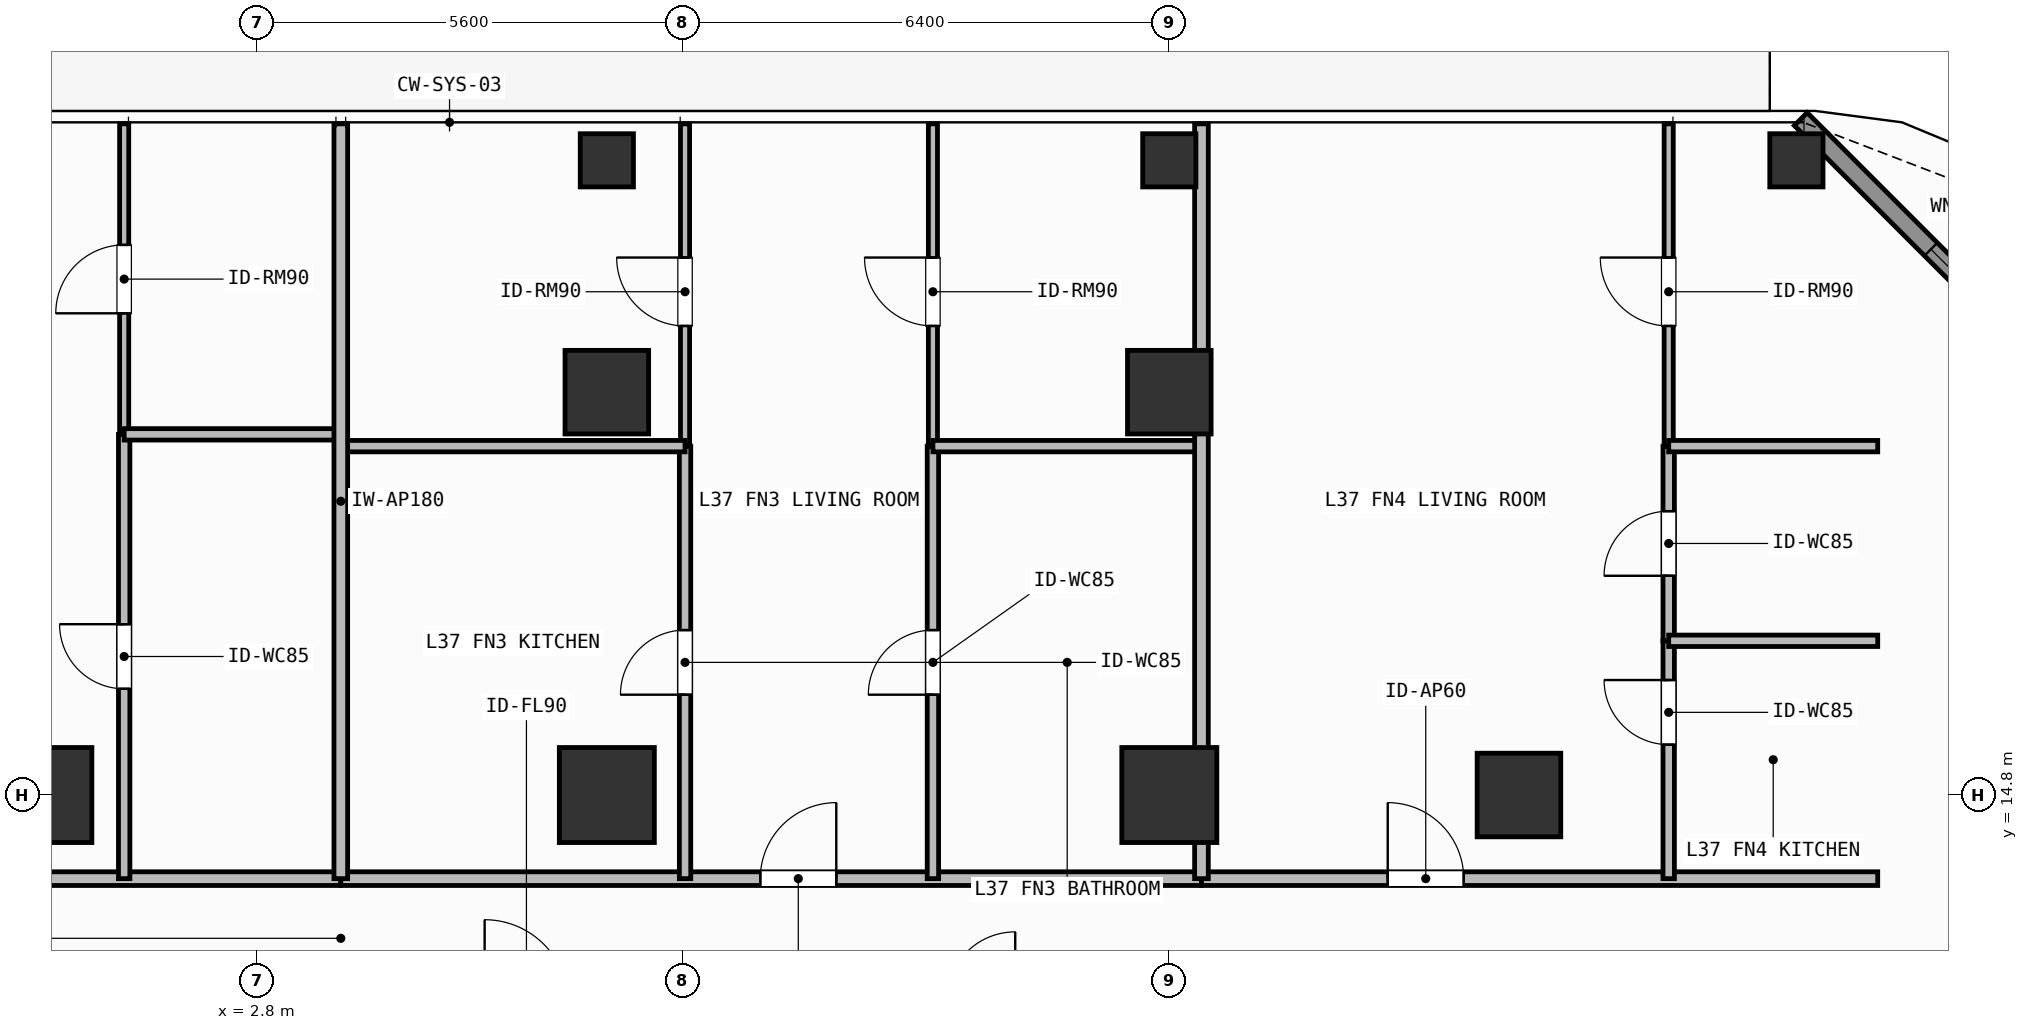
"""IFC4 building model, lengths in metres.
Left out: names, types, materials, properties, quantities, classifications, styles, units other than length and angle.
Written with IfcOpenShell. Run it as: python <this file> out.ifc"""

import sys

from ifc_helpers import new_model, si_unit, direction, frame, frame_2d, origin, origin_2d, place, context, subcontext, project, spatial, rectangle, hollow_rectangle, extrude, element, fill, save


model = new_model("IFC4")
c1 = context("Model", 3, precision=1e-05, world=origin(), true_north=direction((0.0, 1.0)))
c2 = subcontext(c1, "Body", "Model", "MODEL_VIEW")
j1 = project(units=[si_unit("LENGTHUNIT", "METRE"), si_unit("PLANEANGLEUNIT", "RADIAN")], contexts=[c1])
p1 = place(None, origin())
s1 = spatial("IfcSite", under=j1, at=p1, CompositionType="ELEMENT")
p2 = place(p1, origin())
s2 = spatial("IfcBuilding", under=s1, at=p2, CompositionType="ELEMENT")
p3 = place(p2, frame((0.0, 0.0, 148.5)))
s3 = spatial("IfcBuildingStorey", under=s2, at=p3, CompositionType="ELEMENT", Elevation=148.5)
for number, where, z_axis, x_axis in (
    (1, (0.0, 14.8, 0.0), (0.0, 0.0, 1.0), (1.0, 0.0, 0.0)),
    (2, (7.4, 14.8, 0.0), (0.0, 0.0, 1.0), (1.0, 0.0, 0.0)),
    (3, (14.8, 14.8, 0.0), (0.0, 0.0, 1.0), (1.0, 0.0, 0.0)),
):
    element("IfcColumn", number, at=place(p3, frame(where, z_axis=z_axis, x_axis=x_axis)), inside=s3, PredefinedType="COLUMN", context=c2, shape_type="SweptSolid", body=[
        extrude(rectangle(XDim=1.25, YDim=1.25, at=origin_2d()), origin(), (0.0, 0.0, 1.0), 3.9),
    ])
for number, where, z_axis, x_axis in (
    (4, (19.4, 14.8, 0.0), (0.0, 0.0, 1.0), (1.0, 0.0, 0.0)),
    (5, (7.4, 20.1, 0.0), (0.0, 0.0, 1.0), (1.0, 0.0, 0.0)),
    (6, (14.8, 20.1, 0.0), (0.0, 0.0, 1.0), (1.0, 0.0, 0.0)),
):
    element("IfcColumn", number, at=place(p3, frame(where, z_axis=z_axis, x_axis=x_axis)), inside=s3, PredefinedType="COLUMN", context=c2, shape_type="SweptSolid", body=[
        extrude(rectangle(XDim=1.1, YDim=1.1, at=origin_2d()), origin(), (0.0, 0.0, 1.0), 3.9),
    ])
for number, where, z_axis, x_axis in (
    (7, (23.05, 23.15, 0.0), (0.0, 0.0, 1.0), (1.0, 0.0, 0.0)),
    (8, (7.4, 23.15, 0.0), (0.0, 0.0, 1.0), (1.0, 0.0, 0.0)),
    (9, (14.8, 23.15, 0.0), (0.0, 0.0, 1.0), (1.0, 0.0, 0.0)),
):
    element("IfcColumn", number, at=place(p3, frame(where, z_axis=z_axis, x_axis=x_axis)), inside=s3, PredefinedType="COLUMN", context=c2, shape_type="SweptSolid", body=[
        extrude(hollow_rectangle(XDim=0.7, YDim=0.7, WallThickness=0.032, at=origin_2d()), origin(), (0.0, 0.0, 1.0), 3.9),
    ])
p4 = place(p3, frame((23.108, 23.692, 0.0), z_axis=(0.0, 0.0, 1.0), x_axis=(0.707087534163, -0.707126027686, 0.0)))
e10 = element("IfcWall", 10, at=p4, inside=s3, PredefinedType="SOLIDWALL", context=c2, shape_type="SweptSolid", body=[
    extrude(rectangle(XDim=6.342, YDim=0.24, at=frame_2d((3.171, 0.0))), origin(), (0.0, 0.0, 1.0), 3.68),
])
p5 = place(p4, frame((2.421, 0.0, 0.8)))
e11 = element("IfcOpeningElement", 11, at=p5, cuts=e10, PredefinedType="OPENING", context=c2, shape_type="SweptSolid", body=[
    extrude(rectangle(XDim=1.5, YDim=1.85, at=frame_2d((0.75, 0.925))), frame((0.0, 0.13, 0.0), z_axis=(0.0, -1.0, 0.0), x_axis=(1.0, 0.0, 0.0)), (0.0, 0.0, 1.0), 0.26),
])
p6 = place(p3, frame((-7.423, 13.7, 0.0), z_axis=(0.0, 0.0, 1.0), x_axis=(1.0, 0.0, 0.0)))
e12 = element("IfcWall", 12, at=p6, inside=s3, PredefinedType="PARTITIONING", context=c2, shape_type="SweptSolid", body=[
    extrude(rectangle(XDim=11.323, YDim=0.18, at=frame_2d((5.662, 0.0))), origin(), (0.0, 0.0, 1.0), 3.68),
])
p7 = place(p6, frame((5.34, 0.0, 0.0)))
e13 = element("IfcOpeningElement", 13, at=p7, cuts=e12, PredefinedType="OPENING", context=c2, shape_type="SweptSolid", body=[
    extrude(rectangle(XDim=1.0, YDim=2.2, at=frame_2d((0.5, 1.1))), frame((0.0, 0.1, 0.0), z_axis=(0.0, -1.0, 0.0), x_axis=(1.0, 0.0, 0.0)), (0.0, 0.0, 1.0), 0.2),
])
p8 = place(p3, frame((1.05, 13.7, 0.0), z_axis=(0.0, 0.0, 1.0), x_axis=(0.0, 1.0, 0.0)))
e14 = element("IfcWall", 14, at=p8, inside=s3, PredefinedType="PARTITIONING", context=c2, shape_type="SweptSolid", body=[
    extrude(rectangle(XDim=5.845, YDim=0.15, at=frame_2d((2.922, 0.0))), origin(), (0.0, 0.0, 1.0), 3.68),
])
p9 = place(p8, frame((2.498, 0.0, 0.0)))
e15 = element("IfcOpeningElement", 15, at=p9, cuts=e14, PredefinedType="OPENING", context=c2, shape_type="SweptSolid", body=[
    extrude(rectangle(XDim=0.85, YDim=2.1, at=frame_2d((0.425, 1.05))), frame((0.0, 0.085, 0.0), z_axis=(0.0, -1.0, 0.0), x_axis=(1.0, 0.0, 0.0)), (0.0, 0.0, 1.0), 0.17),
])
p10 = place(p3, frame((1.05, 19.545, 0.0), z_axis=(0.0, 0.0, 1.0), x_axis=(0.0, 1.0, 0.0)))
e16 = element("IfcWall", 16, at=p10, inside=s3, PredefinedType="PARTITIONING", context=c2, shape_type="SweptSolid", body=[
    extrude(rectangle(XDim=4.085, YDim=0.12, at=frame_2d((2.042, 0.0))), origin(), (0.0, 0.0, 1.0), 3.68),
])
p11 = place(p10, frame((1.593, 0.0, 0.0)))
e17 = element("IfcOpeningElement", 17, at=p11, cuts=e16, PredefinedType="OPENING", context=c2, shape_type="SweptSolid", body=[
    extrude(rectangle(XDim=0.9, YDim=2.1, at=frame_2d((0.45, 1.05))), frame((0.0, 0.07, 0.0), z_axis=(0.0, -1.0, 0.0), x_axis=(1.0, 0.0, 0.0)), (0.0, 0.0, 1.0), 0.14),
])
p12 = place(p3, frame((3.9, 13.7, 0.0), z_axis=(0.0, 0.0, 1.0), x_axis=(1.0, 0.0, 0.0)))
e18 = element("IfcWall", 18, at=p12, inside=s3, PredefinedType="PARTITIONING", context=c2, shape_type="SweptSolid", body=[
    extrude(rectangle(XDim=11.323, YDim=0.18, at=frame_2d((5.662, 0.0))), origin(), (0.0, 0.0, 1.0), 3.68),
])
p13 = place(p12, frame((5.519, 0.0, 0.0)))
e19 = element("IfcOpeningElement", 19, at=p13, cuts=e18, PredefinedType="OPENING", context=c2, shape_type="SweptSolid", body=[
    extrude(rectangle(XDim=1.0, YDim=2.2, at=frame_2d((0.5, 1.1))), frame((0.0, 0.1, 0.0), z_axis=(0.0, -1.0, 0.0), x_axis=(1.0, 0.0, 0.0)), (0.0, 0.0, 1.0), 0.2),
])
p14 = place(p3, frame((8.429, 13.7, 0.0), z_axis=(0.0, 0.0, 1.0), x_axis=(0.0, 1.0, 0.0)))
e20 = element("IfcWall", 20, at=p14, inside=s3, PredefinedType="PARTITIONING", context=c2, shape_type="SweptSolid", body=[
    extrude(rectangle(XDim=5.69, YDim=0.15, at=frame_2d((2.845, 0.0))), origin(), (0.0, 0.0, 1.0), 3.68),
])
p15 = place(p14, frame((2.42, 0.0, 0.0)))
e21 = element("IfcOpeningElement", 21, at=p15, cuts=e20, PredefinedType="OPENING", context=c2, shape_type="SweptSolid", body=[
    extrude(rectangle(XDim=0.85, YDim=2.1, at=frame_2d((0.425, 1.05))), frame((0.0, 0.085, 0.0), z_axis=(0.0, -1.0, 0.0), x_axis=(1.0, 0.0, 0.0)), (0.0, 0.0, 1.0), 0.17),
])
p16 = place(p3, frame((8.429, 19.39, 0.0), z_axis=(0.0, 0.0, 1.0), x_axis=(0.0, 1.0, 0.0)))
e22 = element("IfcWall", 22, at=p16, inside=s3, PredefinedType="PARTITIONING", context=c2, shape_type="SweptSolid", body=[
    extrude(rectangle(XDim=4.24, YDim=0.12, at=frame_2d((2.12, 0.0))), origin(), (0.0, 0.0, 1.0), 3.68),
])
p17 = place(p16, frame((1.581, 0.0, 0.0)))
e23 = element("IfcOpeningElement", 23, at=p17, cuts=e22, PredefinedType="OPENING", context=c2, shape_type="SweptSolid", body=[
    extrude(rectangle(XDim=0.9, YDim=2.1, at=frame_2d((0.45, 1.05))), frame((0.0, 0.07, 0.0), z_axis=(0.0, -1.0, 0.0), x_axis=(1.0, 0.0, 0.0)), (0.0, 0.0, 1.0), 0.14),
])
p18 = place(p3, frame((11.69, 13.7, 0.0), z_axis=(0.0, 0.0, 1.0), x_axis=(0.0, 1.0, 0.0)))
e24 = element("IfcWall", 24, at=p18, inside=s3, PredefinedType="PARTITIONING", context=c2, shape_type="SweptSolid", body=[
    extrude(rectangle(XDim=5.69, YDim=0.15, at=frame_2d((2.845, 0.0))), origin(), (0.0, 0.0, 1.0), 3.68),
])
p19 = place(p18, frame((2.42, 0.0, 0.0)))
e25 = element("IfcOpeningElement", 25, at=p19, cuts=e24, PredefinedType="OPENING", context=c2, shape_type="SweptSolid", body=[
    extrude(rectangle(XDim=0.85, YDim=2.1, at=frame_2d((0.425, 1.05))), frame((0.0, 0.085, 0.0), z_axis=(0.0, -1.0, 0.0), x_axis=(1.0, 0.0, 0.0)), (0.0, 0.0, 1.0), 0.17),
])
p20 = place(p3, frame((11.69, 19.39, 0.0), z_axis=(0.0, 0.0, 1.0), x_axis=(0.0, 1.0, 0.0)))
e26 = element("IfcWall", 26, at=p20, inside=s3, PredefinedType="PARTITIONING", context=c2, shape_type="SweptSolid", body=[
    extrude(rectangle(XDim=4.24, YDim=0.12, at=frame_2d((2.12, 0.0))), origin(), (0.0, 0.0, 1.0), 3.68),
])
p21 = place(p20, frame((1.581, 0.0, 0.0)))
e27 = element("IfcOpeningElement", 27, at=p21, cuts=e26, PredefinedType="OPENING", context=c2, shape_type="SweptSolid", body=[
    extrude(rectangle(XDim=0.9, YDim=2.1, at=frame_2d((0.45, 1.05))), frame((0.0, 0.07, 0.0), z_axis=(0.0, -1.0, 0.0), x_axis=(1.0, 0.0, 0.0)), (0.0, 0.0, 1.0), 0.14),
])
p22 = place(p3, frame((15.223, 13.7, 0.0), z_axis=(0.0, 0.0, 1.0), x_axis=(1.0, 0.0, 0.0)))
e28 = element("IfcWall", 28, at=p22, inside=s3, PredefinedType="PARTITIONING", context=c2, shape_type="SweptSolid", body=[
    extrude(rectangle(XDim=8.897, YDim=0.18, at=frame_2d((4.449, 0.0))), origin(), (0.0, 0.0, 1.0), 3.68),
])
p23 = place(p22, frame((2.451, 0.0, 0.0)))
e29 = element("IfcOpeningElement", 29, at=p23, cuts=e28, PredefinedType="OPENING", context=c2, shape_type="SweptSolid", body=[
    extrude(rectangle(XDim=1.0, YDim=2.2, at=frame_2d((0.5, 1.1))), frame((0.0, 0.1, 0.0), z_axis=(0.0, -1.0, 0.0), x_axis=(1.0, 0.0, 0.0)), (0.0, 0.0, 1.0), 0.2),
])
p24 = place(p3, frame((21.37, 13.7, 0.0), z_axis=(0.0, 0.0, 1.0), x_axis=(0.0, 1.0, 0.0)))
e30 = element("IfcWall", 30, at=p24, inside=s3, PredefinedType="PARTITIONING", context=c2, shape_type="SweptSolid", body=[
    extrude(rectangle(XDim=3.129, YDim=0.15, at=frame_2d((1.564, 0.0))), origin(), (0.0, 0.0, 1.0), 3.68),
])
p25 = place(p24, frame((1.763, 0.0, 0.0)))
e31 = element("IfcOpeningElement", 31, at=p25, cuts=e30, PredefinedType="OPENING", context=c2, shape_type="SweptSolid", body=[
    extrude(rectangle(XDim=0.85, YDim=2.1, at=frame_2d((0.425, 1.05))), frame((0.0, 0.085, 0.0), z_axis=(0.0, -1.0, 0.0), x_axis=(1.0, 0.0, 0.0)), (0.0, 0.0, 1.0), 0.17),
])
p26 = place(p3, frame((21.37, 16.829, 0.0), z_axis=(0.0, 0.0, 1.0), x_axis=(0.0, 1.0, 0.0)))
e32 = element("IfcWall", 32, at=p26, inside=s3, PredefinedType="PARTITIONING", context=c2, shape_type="SweptSolid", body=[
    extrude(rectangle(XDim=2.561, YDim=0.15, at=frame_2d((1.28, 0.0))), origin(), (0.0, 0.0, 1.0), 3.68),
])
p27 = place(p26, frame((0.855, 0.0, 0.0)))
e33 = element("IfcOpeningElement", 33, at=p27, cuts=e32, PredefinedType="OPENING", context=c2, shape_type="SweptSolid", body=[
    extrude(rectangle(XDim=0.85, YDim=2.1, at=frame_2d((0.425, 1.05))), frame((0.0, 0.085, 0.0), z_axis=(0.0, -1.0, 0.0), x_axis=(1.0, 0.0, 0.0)), (0.0, 0.0, 1.0), 0.17),
])
p28 = place(p3, frame((21.37, 19.39, 0.0), z_axis=(0.0, 0.0, 1.0), x_axis=(0.0, 1.0, 0.0)))
e34 = element("IfcWall", 34, at=p28, inside=s3, PredefinedType="PARTITIONING", context=c2, shape_type="SweptSolid", body=[
    extrude(rectangle(XDim=4.24, YDim=0.12, at=frame_2d((2.12, 0.0))), origin(), (0.0, 0.0, 1.0), 3.68),
])
p29 = place(p28, frame((1.581, 0.0, 0.0)))
e35 = element("IfcOpeningElement", 35, at=p29, cuts=e34, PredefinedType="OPENING", context=c2, shape_type="SweptSolid", body=[
    extrude(rectangle(XDim=0.9, YDim=2.1, at=frame_2d((0.45, 1.05))), frame((0.0, 0.07, 0.0), z_axis=(0.0, -1.0, 0.0), x_axis=(1.0, 0.0, 0.0)), (0.0, 0.0, 1.0), 0.14),
])
p30 = place(p3, frame((1.05, 19.545, 0.0), z_axis=(0.0, 0.0, 1.0), x_axis=(1.0, 0.0, 0.0)))
e36 = element("IfcWall", 36, at=p30, inside=s3, PredefinedType="PARTITIONING", context=c2, shape_type="SweptSolid", body=[
    extrude(rectangle(XDim=2.85, YDim=0.15, at=frame_2d((1.425, 0.0))), origin(), (0.0, 0.0, 1.0), 3.68),
])
p31 = place(p3, frame((3.9, 19.39, 0.0), z_axis=(0.0, 0.0, 1.0), x_axis=(1.0, 0.0, 0.0)))
e37 = element("IfcWall", 37, at=p31, inside=s3, PredefinedType="PARTITIONING", context=c2, shape_type="SweptSolid", body=[
    extrude(rectangle(XDim=4.529, YDim=0.15, at=frame_2d((2.265, 0.0))), origin(), (0.0, 0.0, 1.0), 3.68),
])
p32 = place(p3, frame((11.69, 19.39, 0.0), z_axis=(0.0, 0.0, 1.0), x_axis=(1.0, 0.0, 0.0)))
e38 = element("IfcWall", 38, at=p32, inside=s3, PredefinedType="PARTITIONING", context=c2, shape_type="SweptSolid", body=[
    extrude(rectangle(XDim=3.533, YDim=0.15, at=frame_2d((1.767, 0.0))), origin(), (0.0, 0.0, 1.0), 3.68),
])
p33 = place(p3, frame((3.9, 13.7, 0.0), z_axis=(0.0, 0.0, 1.0), x_axis=(0.0, 1.0, 0.0)))
e39 = element("IfcWall", 39, at=p33, inside=s3, PredefinedType="PARTITIONING", context=c2, shape_type="SweptSolid", body=[
    extrude(rectangle(XDim=9.93, YDim=0.18, at=frame_2d((4.965, 0.0))), origin(), (0.0, 0.0, 1.0), 3.68),
])
for number, where, z_axis, x_axis in (
    (40, (21.37, 16.829, 0.0), (0.0, 0.0, 1.0), (1.0, 0.0, 0.0)),
    (41, (21.37, 19.39, 0.0), (0.0, 0.0, 1.0), (1.0, 0.0, 0.0)),
):
    element("IfcWall", number, at=place(p3, frame(where, z_axis=z_axis, x_axis=x_axis)), inside=s3, PredefinedType="PARTITIONING", context=c2, shape_type="SweptSolid", body=[
        extrude(rectangle(XDim=2.75, YDim=0.15, at=frame_2d((1.375, 0.0))), origin(), (0.0, 0.0, 1.0), 3.68),
    ])
p34 = place(p3, frame((15.223, 13.7, 0.0), z_axis=(0.0, 0.0, 1.0), x_axis=(0.0, 1.0, 0.0)))
e42 = element("IfcWall", 42, at=p34, inside=s3, PredefinedType="PARTITIONING", context=c2, shape_type="SweptSolid", body=[
    extrude(rectangle(XDim=9.93, YDim=0.18, at=frame_2d((4.965, 0.0))), origin(), (0.0, 0.0, 1.0), 3.68),
])
p35 = place(p5, origin())
e43 = element("IfcWindow", 43, at=p35, inside=s3, PartitioningType="SINGLE_PANEL", PredefinedType="WINDOW", context=c2, shape_type="SweptSolid", body=[
    extrude(rectangle(XDim=1.5, YDim=1.85, at=frame_2d((0.75, 0.925))), frame((0.0, 0.03, 0.0), z_axis=(0.0, -1.0, 0.0), x_axis=(1.0, 0.0, 0.0)), (0.0, 0.0, 1.0), 0.06),
])
fill(e11, e43)
p36 = place(p9, origin())
e44 = element("IfcDoor", 44, at=p36, inside=s3, OperationType="SINGLE_SWING_RIGHT", PredefinedType="DOOR", context=c2, shape_type="SweptSolid", body=[
    extrude(rectangle(XDim=0.85, YDim=2.1, at=frame_2d((0.425, 1.05))), frame((0.0, 0.025, 0.0), z_axis=(0.0, -1.0, 0.0), x_axis=(1.0, 0.0, 0.0)), (0.0, 0.0, 1.0), 0.05),
])
fill(e15, e44)
p37 = place(p11, origin())
e45 = element("IfcDoor", 45, at=p37, inside=s3, OperationType="SINGLE_SWING_LEFT", PredefinedType="DOOR", context=c2, shape_type="SweptSolid", body=[
    extrude(rectangle(XDim=0.9, YDim=2.1, at=frame_2d((0.45, 1.05))), frame((0.0, 0.025, 0.0), z_axis=(0.0, -1.0, 0.0), x_axis=(1.0, 0.0, 0.0)), (0.0, 0.0, 1.0), 0.05),
])
fill(e17, e45)
p38 = place(p13, origin())
e46 = element("IfcDoor", 46, at=p38, inside=s3, OperationType="SINGLE_SWING_RIGHT", PredefinedType="DOOR", context=c2, shape_type="SweptSolid", body=[
    extrude(rectangle(XDim=1.0, YDim=2.2, at=frame_2d((0.5, 1.1))), frame((0.0, 0.025, 0.0), z_axis=(0.0, -1.0, 0.0), x_axis=(1.0, 0.0, 0.0)), (0.0, 0.0, 1.0), 0.05),
])
fill(e19, e46)
p39 = place(p15, origin())
e47 = element("IfcDoor", 47, at=p39, inside=s3, OperationType="SINGLE_SWING_LEFT", PredefinedType="DOOR", context=c2, shape_type="SweptSolid", body=[
    extrude(rectangle(XDim=0.85, YDim=2.1, at=frame_2d((0.425, 1.05))), frame((0.0, 0.025, 0.0), z_axis=(0.0, -1.0, 0.0), x_axis=(1.0, 0.0, 0.0)), (0.0, 0.0, 1.0), 0.05),
])
fill(e21, e47)
p40 = place(p17, origin())
e48 = element("IfcDoor", 48, at=p40, inside=s3, OperationType="SINGLE_SWING_RIGHT", PredefinedType="DOOR", context=c2, shape_type="SweptSolid", body=[
    extrude(rectangle(XDim=0.9, YDim=2.1, at=frame_2d((0.45, 1.05))), frame((0.0, 0.025, 0.0), z_axis=(0.0, -1.0, 0.0), x_axis=(1.0, 0.0, 0.0)), (0.0, 0.0, 1.0), 0.05),
])
fill(e23, e48)
p41 = place(p19, origin())
e49 = element("IfcDoor", 49, at=p41, inside=s3, OperationType="SINGLE_SWING_LEFT", PredefinedType="DOOR", context=c2, shape_type="SweptSolid", body=[
    extrude(rectangle(XDim=0.85, YDim=2.1, at=frame_2d((0.425, 1.05))), frame((0.0, 0.025, 0.0), z_axis=(0.0, -1.0, 0.0), x_axis=(1.0, 0.0, 0.0)), (0.0, 0.0, 1.0), 0.05),
])
fill(e25, e49)
p42 = place(p21, origin())
e50 = element("IfcDoor", 50, at=p42, inside=s3, OperationType="SINGLE_SWING_RIGHT", PredefinedType="DOOR", context=c2, shape_type="SweptSolid", body=[
    extrude(rectangle(XDim=0.9, YDim=2.1, at=frame_2d((0.45, 1.05))), frame((0.0, 0.025, 0.0), z_axis=(0.0, -1.0, 0.0), x_axis=(1.0, 0.0, 0.0)), (0.0, 0.0, 1.0), 0.05),
])
fill(e27, e50)
p43 = place(p23, origin())
e51 = element("IfcDoor", 51, at=p43, inside=s3, OperationType="SINGLE_SWING_LEFT", PredefinedType="DOOR", context=c2, shape_type="SweptSolid", body=[
    extrude(rectangle(XDim=1.0, YDim=2.2, at=frame_2d((0.5, 1.1))), frame((0.0, 0.025, 0.0), z_axis=(0.0, -1.0, 0.0), x_axis=(1.0, 0.0, 0.0)), (0.0, 0.0, 1.0), 0.05),
])
fill(e29, e51)
p44 = place(p25, origin())
e52 = element("IfcDoor", 52, at=p44, inside=s3, OperationType="SINGLE_SWING_RIGHT", PredefinedType="DOOR", context=c2, shape_type="SweptSolid", body=[
    extrude(rectangle(XDim=0.85, YDim=2.1, at=frame_2d((0.425, 1.05))), frame((0.0, 0.025, 0.0), z_axis=(0.0, -1.0, 0.0), x_axis=(1.0, 0.0, 0.0)), (0.0, 0.0, 1.0), 0.05),
])
fill(e31, e52)
p45 = place(p27, origin())
e53 = element("IfcDoor", 53, at=p45, inside=s3, OperationType="SINGLE_SWING_LEFT", PredefinedType="DOOR", context=c2, shape_type="SweptSolid", body=[
    extrude(rectangle(XDim=0.85, YDim=2.1, at=frame_2d((0.425, 1.05))), frame((0.0, 0.025, 0.0), z_axis=(0.0, -1.0, 0.0), x_axis=(1.0, 0.0, 0.0)), (0.0, 0.0, 1.0), 0.05),
])
fill(e33, e53)
p46 = place(p29, origin())
e54 = element("IfcDoor", 54, at=p46, inside=s3, OperationType="SINGLE_SWING_RIGHT", PredefinedType="DOOR", context=c2, shape_type="SweptSolid", body=[
    extrude(rectangle(XDim=0.9, YDim=2.1, at=frame_2d((0.45, 1.05))), frame((0.0, 0.025, 0.0), z_axis=(0.0, -1.0, 0.0), x_axis=(1.0, 0.0, 0.0)), (0.0, 0.0, 1.0), 0.05),
])
fill(e35, e54)
save(model, sys.argv[1])
